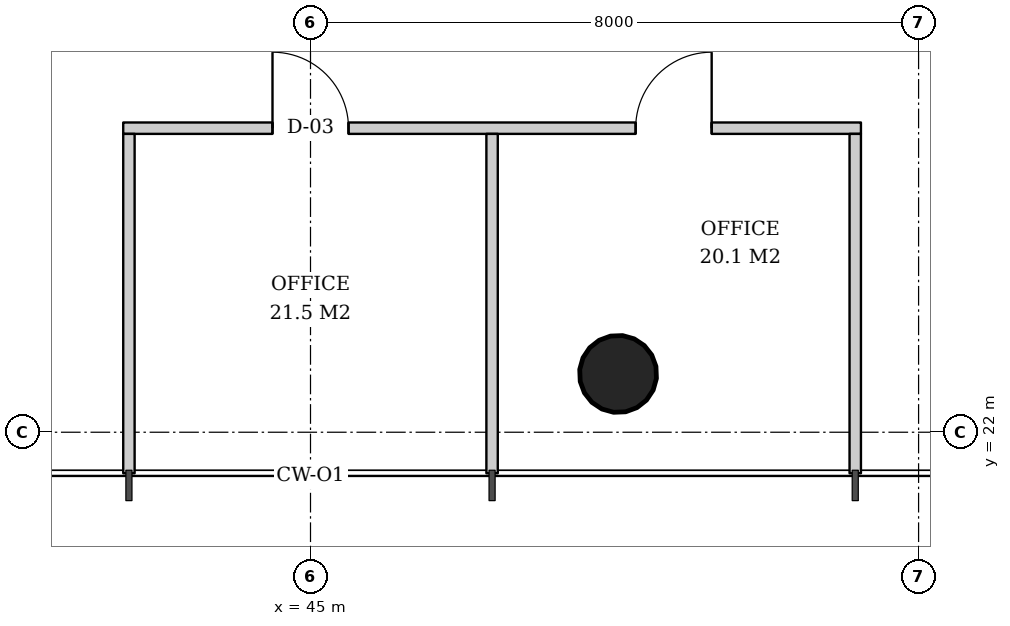
"""IFC4 building model, lengths in metres.
Left out: names, types, materials, properties, quantities, classifications, styles, units other than length and angle.
Written with IfcOpenShell. Run it as: python <this file> out.ifc"""

import sys

from ifc_helpers import new_model, si_unit, direction, frame, frame_2d, origin, origin_2d, place, context, subcontext, project, spatial, rectangle, hollow_circle, extrude, element, fill, save


model = new_model("IFC4")
c1 = context("Model", 3, precision=1e-05, world=origin(), true_north=direction((0.0, 1.0)))
c2 = subcontext(c1, "Body", "Model", "MODEL_VIEW")
j1 = project(units=[si_unit("LENGTHUNIT", "METRE"), si_unit("PLANEANGLEUNIT", "RADIAN")], contexts=[c1])
p1 = place(None, origin())
s1 = spatial("IfcSite", under=j1, at=p1, CompositionType="ELEMENT")
p2 = place(p1, origin())
s2 = spatial("IfcBuilding", under=s1, at=p2, CompositionType="ELEMENT")
p3 = place(p2, frame((0.0, 0.0, 43.8)))
s3 = spatial("IfcBuildingStorey", under=s2, at=p3, CompositionType="ELEMENT", Elevation=43.8)
p4 = place(p3, frame((49.054, 22.729, 0.0), z_axis=(-0.00635704258, 0.031977850555, 0.999468361222), x_axis=(-0.980807266515, -0.194979757801, 0.0)))
e1 = element("IfcColumn", 1, at=p4, inside=s3, PredefinedType="COLUMN", context=c2, shape_type="SweptSolid", body=[
    extrude(hollow_circle(Radius=0.508, WallThickness=0.04, at=origin_2d()), origin(), (0.0, 0.0, 1.0), 3.802),
])
p5 = place(p3, frame((42.536, 26.0, 0.0), z_axis=(0.0, 0.0, 1.0), x_axis=(1.0, 0.0, 0.0)))
e2 = element("IfcWall", 2, at=p5, inside=s3, PredefinedType="PARTITIONING", context=c2, shape_type="SweptSolid", body=[
    extrude(rectangle(XDim=9.706, YDim=0.15, at=frame_2d((4.853, 0.0))), origin(), (0.0, 0.0, 1.0), 2.85),
])
p6 = place(p5, frame((1.964, 0.0, 0.0)))
e3 = element("IfcOpeningElement", 3, at=p6, cuts=e2, PredefinedType="OPENING", context=c2, shape_type="SweptSolid", body=[
    extrude(rectangle(XDim=1.0, YDim=2.1, at=frame_2d((0.5, 1.05))), frame((0.0, 0.085, 0.0), z_axis=(0.0, -1.0, 0.0), x_axis=(1.0, 0.0, 0.0)), (0.0, 0.0, 1.0), 0.17),
])
p7 = place(p5, frame((6.742, 0.0, 0.0)))
e4 = element("IfcOpeningElement", 4, at=p7, cuts=e2, PredefinedType="OPENING", context=c2, shape_type="SweptSolid", body=[
    extrude(rectangle(XDim=1.0, YDim=2.1, at=frame_2d((0.5, 1.05))), frame((0.0, 0.085, 0.0), z_axis=(0.0, -1.0, 0.0), x_axis=(1.0, 0.0, 0.0)), (0.0, 0.0, 1.0), 0.17),
])
for number, where, z_axis, x_axis in (
    (5, (42.611, 25.925, 0.0), (0.0, 0.0, 1.0), (0.0, -1.0, 0.0)),
    (6, (47.389, 25.925, 0.0), (0.0, 0.0, 1.0), (0.0, -1.0, 0.0)),
):
    element("IfcWall", number, at=place(p3, frame(where, z_axis=z_axis, x_axis=x_axis)), inside=s3, PredefinedType="PARTITIONING", context=c2, shape_type="SweptSolid", body=[
        extrude(rectangle(XDim=4.465, YDim=0.15, at=frame_2d((2.232, 0.0))), origin(), (0.0, 0.0, 1.0), 3.02),
    ])
p8 = place(p3, frame((52.167, 25.925, 0.0), z_axis=(0.0, 0.0, 1.0), x_axis=(0.0, -1.0, 0.0)))
e7 = element("IfcWall", 7, at=p8, inside=s3, PredefinedType="PARTITIONING", context=c2, shape_type="SweptSolid", body=[
    extrude(rectangle(XDim=4.465, YDim=0.15, at=frame_2d((2.232, 0.0))), origin(), (0.0, 0.0, 1.0), 2.85),
])
p9 = place(p6, origin())
e8 = element("IfcDoor", 8, at=p9, inside=s3, OperationType="SINGLE_SWING_LEFT", PredefinedType="DOOR", context=c2, shape_type="SweptSolid", body=[
    extrude(rectangle(XDim=1.0, YDim=2.1, at=frame_2d((0.5, 1.05))), frame((0.0, 0.025, 0.0), z_axis=(0.0, -1.0, 0.0), x_axis=(1.0, 0.0, 0.0)), (0.0, 0.0, 1.0), 0.05),
])
fill(e3, e8)
p10 = place(p7, origin())
e9 = element("IfcDoor", 9, at=p10, inside=s3, OperationType="SINGLE_SWING_RIGHT", PredefinedType="DOOR", context=c2, shape_type="SweptSolid", body=[
    extrude(rectangle(XDim=1.0, YDim=2.1, at=frame_2d((0.5, 1.05))), frame((0.0, 0.025, 0.0), z_axis=(0.0, -1.0, 0.0), x_axis=(1.0, 0.0, 0.0)), (0.0, 0.0, 1.0), 0.05),
])
fill(e4, e9)
save(model, sys.argv[1])
